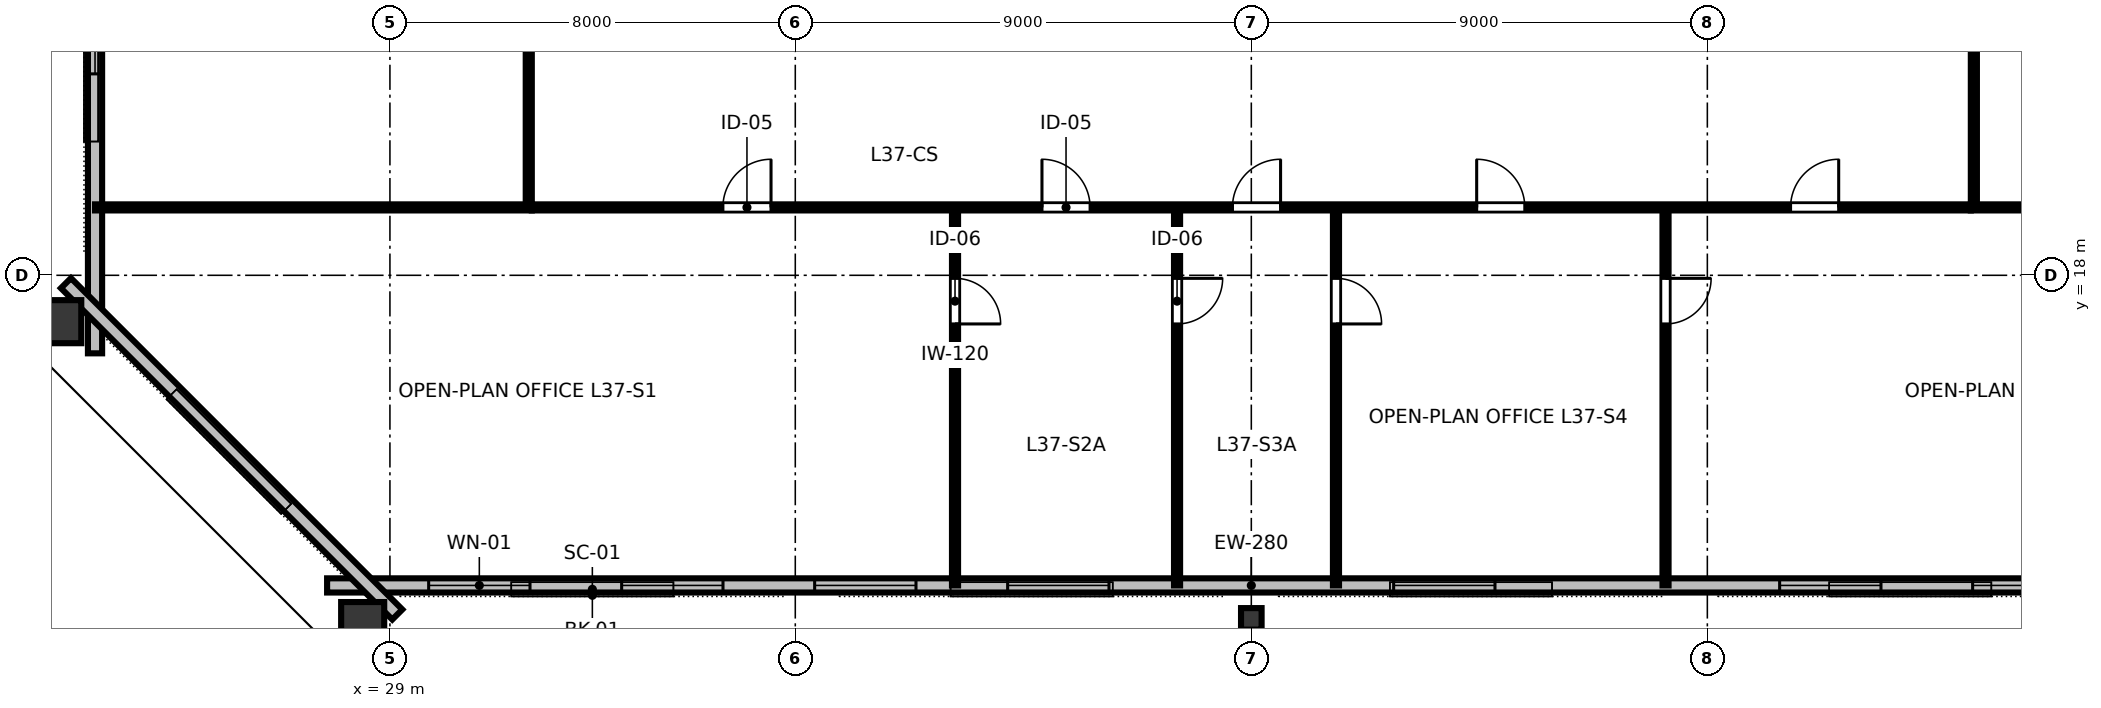
"""IFC4 building model, lengths in metres.
Left out: names, types, materials, properties, quantities, classifications, styles, units other than length and angle.
Written with IfcOpenShell. Run it as: python <this file> out.ifc"""

import sys

from ifc_helpers import new_model, si_unit, direction, frame, frame_2d, origin, origin_2d, place, context, subcontext, project, spatial, rectangle, hollow_rectangle, i_section, extrude, element, fill, save


model = new_model("IFC4")
c1 = context("Model", 3, precision=1e-05, world=origin(), true_north=direction((0.0, 1.0)))
c2 = subcontext(c1, "Body", "Model", "MODEL_VIEW")
j1 = project(units=[si_unit("LENGTHUNIT", "METRE"), si_unit("PLANEANGLEUNIT", "RADIAN")], contexts=[c1])
p1 = place(None, origin())
s1 = spatial("IfcSite", under=j1, at=p1, CompositionType="ELEMENT")
p2 = place(p1, origin())
s2 = spatial("IfcBuilding", under=s1, at=p2, CompositionType="ELEMENT")
p3 = place(p2, frame((0.0, 0.0, 142.0)))
s3 = spatial("IfcBuildingStorey", under=s2, at=p3, CompositionType="ELEMENT", Elevation=142.0)
p4 = place(p3, frame((28.462, 11.052, 0.0), z_axis=(0.0, 0.0, 1.0), x_axis=(1.0, 0.0, 0.0)))
e1 = element("IfcColumn", 1, at=p4, inside=s3, PredefinedType="COLUMN", context=c2, shape_type="SweptSolid", body=[
    extrude(hollow_rectangle(XDim=0.85, YDim=1.0, WallThickness=0.05, at=origin_2d()), origin(), (0.0, 0.0, 1.0), 3.358),
])
p5 = place(p3, frame((46.0, 11.22, 0.0), z_axis=(0.0, 0.0, 1.0), x_axis=(1.0, 0.0, 0.0)))
e2 = element("IfcColumn", 2, at=p5, inside=s3, PredefinedType="COLUMN", context=c2, shape_type="SweptSolid", body=[
    extrude(i_section(OverallWidth=0.406, OverallDepth=0.425, WebThickness=0.033, FlangeThickness=0.052, FilletRadius=0.025, at=origin_2d()), origin(), (0.0, 0.0, 1.0), 3.358),
])
p6 = place(p3, frame((22.409, 17.085, 0.0), z_axis=(0.0, 0.0, 1.0), x_axis=(0.0, 1.0, 0.0)))
e3 = element("IfcColumn", 3, at=p6, inside=s3, PredefinedType="COLUMN", context=c2, shape_type="SweptSolid", body=[
    extrude(hollow_rectangle(XDim=0.85, YDim=1.0, WallThickness=0.05, at=origin_2d()), origin(), (0.0, 0.0, 1.0), 3.358),
])
p7 = place(p3, frame((27.76, 11.88, 0.0), z_axis=(0.0, 0.0, 1.0), x_axis=(1.0, 0.0, 0.0)))
e4 = element("IfcWall", 4, at=p7, inside=s3, PredefinedType="STANDARD", context=c2, shape_type="SweptSolid", body=[
    extrude(rectangle(XDim=36.48, YDim=0.28, at=frame_2d((18.24, 0.0))), origin(), (0.0, 0.0, 1.0), 3.36),
])
p8 = place(p7, frame((2.004, 0.0, 0.8)))
e5 = element("IfcOpeningElement", 5, at=p8, cuts=e4, PredefinedType="OPENING", context=c2, shape_type="SweptSolid", body=[
    extrude(rectangle(XDim=2.0, YDim=1.95, at=frame_2d((1.0, 0.975))), frame((0.0, 0.15, 0.0), z_axis=(0.0, -1.0, 0.0), x_axis=(1.0, 0.0, 0.0)), (0.0, 0.0, 1.0), 0.3),
])
p9 = place(p7, frame((5.813, 0.0, 0.8)))
e6 = element("IfcOpeningElement", 6, at=p9, cuts=e4, PredefinedType="OPENING", context=c2, shape_type="SweptSolid", body=[
    extrude(rectangle(XDim=2.0, YDim=1.95, at=frame_2d((1.0, 0.975))), frame((0.0, 0.15, 0.0), z_axis=(0.0, -1.0, 0.0), x_axis=(1.0, 0.0, 0.0)), (0.0, 0.0, 1.0), 0.3),
])
p10 = place(p7, frame((9.622, 0.0, 0.8)))
e7 = element("IfcOpeningElement", 7, at=p10, cuts=e4, PredefinedType="OPENING", context=c2, shape_type="SweptSolid", body=[
    extrude(rectangle(XDim=2.0, YDim=1.95, at=frame_2d((1.0, 0.975))), frame((0.0, 0.15, 0.0), z_axis=(0.0, -1.0, 0.0), x_axis=(1.0, 0.0, 0.0)), (0.0, 0.0, 1.0), 0.3),
])
p11 = place(p7, frame((13.431, 0.0, 0.8)))
e8 = element("IfcOpeningElement", 8, at=p11, cuts=e4, PredefinedType="OPENING", context=c2, shape_type="SweptSolid", body=[
    extrude(rectangle(XDim=2.0, YDim=1.95, at=frame_2d((1.0, 0.975))), frame((0.0, 0.15, 0.0), z_axis=(0.0, -1.0, 0.0), x_axis=(1.0, 0.0, 0.0)), (0.0, 0.0, 1.0), 0.3),
])
p12 = place(p7, frame((21.049, 0.0, 0.8)))
e9 = element("IfcOpeningElement", 9, at=p12, cuts=e4, PredefinedType="OPENING", context=c2, shape_type="SweptSolid", body=[
    extrude(rectangle(XDim=2.0, YDim=1.95, at=frame_2d((1.0, 0.975))), frame((0.0, 0.15, 0.0), z_axis=(0.0, -1.0, 0.0), x_axis=(1.0, 0.0, 0.0)), (0.0, 0.0, 1.0), 0.3),
])
p13 = place(p7, frame((28.667, 0.0, 0.8)))
e10 = element("IfcOpeningElement", 10, at=p13, cuts=e4, PredefinedType="OPENING", context=c2, shape_type="SweptSolid", body=[
    extrude(rectangle(XDim=2.0, YDim=1.95, at=frame_2d((1.0, 0.975))), frame((0.0, 0.15, 0.0), z_axis=(0.0, -1.0, 0.0), x_axis=(1.0, 0.0, 0.0)), (0.0, 0.0, 1.0), 0.3),
])
p14 = place(p7, frame((32.476, 0.0, 0.8)))
e11 = element("IfcOpeningElement", 11, at=p14, cuts=e4, PredefinedType="OPENING", context=c2, shape_type="SweptSolid", body=[
    extrude(rectangle(XDim=2.0, YDim=1.95, at=frame_2d((1.0, 0.975))), frame((0.0, 0.15, 0.0), z_axis=(0.0, -1.0, 0.0), x_axis=(1.0, 0.0, 0.0)), (0.0, 0.0, 1.0), 0.3),
])
p15 = place(p3, frame((23.18, 47.54, 0.0), z_axis=(0.0, 0.0, 1.0), x_axis=(0.0, -1.0, 0.0)))
e12 = element("IfcWall", 12, at=p15, inside=s3, PredefinedType="STANDARD", context=c2, shape_type="SweptSolid", body=[
    extrude(rectangle(XDim=31.08, YDim=0.28, at=frame_2d((15.54, 0.0))), origin(), (0.0, 0.0, 1.0), 3.36),
])
p16 = place(p15, frame((11.86, 0.0, 0.0)))
e13 = element("IfcOpeningElement", 13, at=p16, cuts=e12, PredefinedType="OPENING", context=c2, shape_type="SweptSolid", body=[
    extrude(rectangle(XDim=1.4, YDim=2.15, at=frame_2d((0.7, 1.075))), frame((0.0, 0.15, 0.0), z_axis=(0.0, -1.0, 0.0), x_axis=(1.0, 0.0, 0.0)), (0.0, 0.0, 1.0), 0.3),
])
p17 = place(p15, frame((5.515, 0.0, 0.8)))
e14 = element("IfcOpeningElement", 14, at=p17, cuts=e12, PredefinedType="OPENING", context=c2, shape_type="SweptSolid", body=[
    extrude(rectangle(XDim=2.0, YDim=1.95, at=frame_2d((1.0, 0.975))), frame((0.0, 0.15, 0.0), z_axis=(0.0, -1.0, 0.0), x_axis=(1.0, 0.0, 0.0)), (0.0, 0.0, 1.0), 0.3),
])
p18 = place(p15, frame((9.125, 0.0, 0.8)))
e15 = element("IfcOpeningElement", 15, at=p18, cuts=e12, PredefinedType="OPENING", context=c2, shape_type="SweptSolid", body=[
    extrude(rectangle(XDim=2.0, YDim=1.95, at=frame_2d((1.0, 0.975))), frame((0.0, 0.15, 0.0), z_axis=(0.0, -1.0, 0.0), x_axis=(1.0, 0.0, 0.0)), (0.0, 0.0, 1.0), 0.3),
])
p19 = place(p15, frame((19.955, 0.0, 0.8)))
e16 = element("IfcOpeningElement", 16, at=p19, cuts=e12, PredefinedType="OPENING", context=c2, shape_type="SweptSolid", body=[
    extrude(rectangle(XDim=2.0, YDim=1.95, at=frame_2d((1.0, 0.975))), frame((0.0, 0.15, 0.0), z_axis=(0.0, -1.0, 0.0), x_axis=(1.0, 0.0, 0.0)), (0.0, 0.0, 1.0), 0.3),
])
p20 = place(p15, frame((23.565, 0.0, 0.8)))
e17 = element("IfcOpeningElement", 17, at=p20, cuts=e12, PredefinedType="OPENING", context=c2, shape_type="SweptSolid", body=[
    extrude(rectangle(XDim=2.0, YDim=1.95, at=frame_2d((1.0, 0.975))), frame((0.0, 0.15, 0.0), z_axis=(0.0, -1.0, 0.0), x_axis=(1.0, 0.0, 0.0)), (0.0, 0.0, 1.0), 0.3),
])
p21 = place(p3, frame((22.606, 17.845, 0.0), z_axis=(0.0, 0.0, 1.0), x_axis=(0.707106781187, -0.707106781187, 0.0)))
e18 = element("IfcWall", 18, at=p21, inside=s3, PredefinedType="STANDARD", context=c2, shape_type="SweptSolid", body=[
    extrude(rectangle(XDim=9.248, YDim=0.28, at=frame_2d((4.624, 0.0))), origin(), (0.0, 0.0, 1.0), 3.36),
])
p22 = place(p3, frame((40.152, 19.34, 0.0), z_axis=(0.0, 0.0, 1.0), x_axis=(0.0, -1.0, 0.0)))
e19 = element("IfcWall", 19, at=p22, inside=s3, PredefinedType="PARTITIONING", context=c2, shape_type="SweptSolid", body=[
    extrude(rectangle(XDim=7.46, YDim=0.12, at=frame_2d((3.73, 0.0))), origin(), (0.0, 0.0, 1.0), 2.64),
])
p23 = place(p22, frame((1.4, 0.0, 0.0)))
e20 = element("IfcOpeningElement", 20, at=p23, cuts=e19, PredefinedType="OPENING", context=c2, shape_type="SweptSolid", body=[
    extrude(rectangle(XDim=0.9, YDim=2.15, at=frame_2d((0.45, 1.075))), frame((0.0, 0.07, 0.0), z_axis=(0.0, -1.0, 0.0), x_axis=(1.0, 0.0, 0.0)), (0.0, 0.0, 1.0), 0.14),
])
p24 = place(p3, frame((44.534, 19.34, 0.0), z_axis=(0.0, 0.0, 1.0), x_axis=(0.0, -1.0, 0.0)))
e21 = element("IfcWall", 21, at=p24, inside=s3, PredefinedType="PARTITIONING", context=c2, shape_type="SweptSolid", body=[
    extrude(rectangle(XDim=7.46, YDim=0.12, at=frame_2d((3.73, 0.0))), origin(), (0.0, 0.0, 1.0), 2.64),
])
p25 = place(p24, frame((1.4, 0.0, 0.0)))
e22 = element("IfcOpeningElement", 22, at=p25, cuts=e21, PredefinedType="OPENING", context=c2, shape_type="SweptSolid", body=[
    extrude(rectangle(XDim=0.9, YDim=2.15, at=frame_2d((0.45, 1.075))), frame((0.0, 0.07, 0.0), z_axis=(0.0, -1.0, 0.0), x_axis=(1.0, 0.0, 0.0)), (0.0, 0.0, 1.0), 0.14),
])
p26 = place(p3, frame((47.671, 19.34, 0.0), z_axis=(0.0, 0.0, 1.0), x_axis=(0.0, -1.0, 0.0)))
e23 = element("IfcWall", 23, at=p26, inside=s3, PredefinedType="PARTITIONING", context=c2, shape_type="SweptSolid", body=[
    extrude(rectangle(XDim=7.46, YDim=0.12, at=frame_2d((3.73, 0.0))), origin(), (0.0, 0.0, 1.0), 2.64),
])
p27 = place(p26, frame((1.4, 0.0, 0.0)))
e24 = element("IfcOpeningElement", 24, at=p27, cuts=e23, PredefinedType="OPENING", context=c2, shape_type="SweptSolid", body=[
    extrude(rectangle(XDim=0.9, YDim=2.15, at=frame_2d((0.45, 1.075))), frame((0.0, 0.07, 0.0), z_axis=(0.0, -1.0, 0.0), x_axis=(1.0, 0.0, 0.0)), (0.0, 0.0, 1.0), 0.14),
])
p28 = place(p3, frame((54.175, 19.34, 0.0), z_axis=(0.0, 0.0, 1.0), x_axis=(0.0, -1.0, 0.0)))
e25 = element("IfcWall", 25, at=p28, inside=s3, PredefinedType="PARTITIONING", context=c2, shape_type="SweptSolid", body=[
    extrude(rectangle(XDim=7.46, YDim=0.12, at=frame_2d((3.73, 0.0))), origin(), (0.0, 0.0, 1.0), 2.64),
])
p29 = place(p28, frame((1.4, 0.0, 0.0)))
e26 = element("IfcOpeningElement", 26, at=p29, cuts=e25, PredefinedType="OPENING", context=c2, shape_type="SweptSolid", body=[
    extrude(rectangle(XDim=0.9, YDim=2.15, at=frame_2d((0.45, 1.075))), frame((0.0, 0.07, 0.0), z_axis=(0.0, -1.0, 0.0), x_axis=(1.0, 0.0, 0.0)), (0.0, 0.0, 1.0), 0.14),
])
p30 = place(p3, frame((31.8, 19.34, 0.0), z_axis=(0.0, 0.0, 1.0), x_axis=(1.0, 0.0, 0.0)))
e27 = element("IfcWall", 27, at=p30, inside=s3, PredefinedType="PARTITIONING", context=c2, shape_type="SweptSolid", body=[
    extrude(rectangle(XDim=28.4, YDim=0.12, at=frame_2d((14.2, 0.0))), origin(), (0.0, 0.0, 1.0), 2.64),
])
p31 = place(p30, frame((3.771, 0.0, 0.0)))
e28 = element("IfcOpeningElement", 28, at=p31, cuts=e27, PredefinedType="OPENING", context=c2, shape_type="SweptSolid", body=[
    extrude(rectangle(XDim=0.95, YDim=2.15, at=frame_2d((0.475, 1.075))), frame((0.0, 0.07, 0.0), z_axis=(0.0, -1.0, 0.0), x_axis=(1.0, 0.0, 0.0)), (0.0, 0.0, 1.0), 0.14),
])
p32 = place(p30, frame((10.068, 0.0, 0.0)))
e29 = element("IfcOpeningElement", 29, at=p32, cuts=e27, PredefinedType="OPENING", context=c2, shape_type="SweptSolid", body=[
    extrude(rectangle(XDim=0.95, YDim=2.15, at=frame_2d((0.475, 1.075))), frame((0.0, 0.07, 0.0), z_axis=(0.0, -1.0, 0.0), x_axis=(1.0, 0.0, 0.0)), (0.0, 0.0, 1.0), 0.14),
])
p33 = place(p30, frame((13.828, 0.0, 0.0)))
e30 = element("IfcOpeningElement", 30, at=p33, cuts=e27, PredefinedType="OPENING", context=c2, shape_type="SweptSolid", body=[
    extrude(rectangle(XDim=0.95, YDim=2.15, at=frame_2d((0.475, 1.075))), frame((0.0, 0.07, 0.0), z_axis=(0.0, -1.0, 0.0), x_axis=(1.0, 0.0, 0.0)), (0.0, 0.0, 1.0), 0.14),
])
p34 = place(p30, frame((18.648, 0.0, 0.0)))
e31 = element("IfcOpeningElement", 31, at=p34, cuts=e27, PredefinedType="OPENING", context=c2, shape_type="SweptSolid", body=[
    extrude(rectangle(XDim=0.95, YDim=2.15, at=frame_2d((0.475, 1.075))), frame((0.0, 0.07, 0.0), z_axis=(0.0, -1.0, 0.0), x_axis=(1.0, 0.0, 0.0)), (0.0, 0.0, 1.0), 0.14),
])
p35 = place(p30, frame((24.842, 0.0, 0.0)))
e32 = element("IfcOpeningElement", 32, at=p35, cuts=e27, PredefinedType="OPENING", context=c2, shape_type="SweptSolid", body=[
    extrude(rectangle(XDim=0.95, YDim=2.15, at=frame_2d((0.475, 1.075))), frame((0.0, 0.07, 0.0), z_axis=(0.0, -1.0, 0.0), x_axis=(1.0, 0.0, 0.0)), (0.0, 0.0, 1.0), 0.14),
])
p36 = place(p3, frame((31.74, 19.4, 0.0), z_axis=(0.0, 0.0, 1.0), x_axis=(0.0, 1.0, 0.0)))
e33 = element("IfcWall", 33, at=p36, inside=s3, PredefinedType="PARTITIONING", context=c2, shape_type="SweptSolid", body=[
    extrude(rectangle(XDim=11.58, YDim=0.12, at=frame_2d((5.79, 0.0))), origin(), (0.0, 0.0, 1.0), 2.64),
])
p37 = place(p36, frame((4.868, 0.0, 0.0)))
e34 = element("IfcOpeningElement", 34, at=p37, cuts=e33, PredefinedType="OPENING", context=c2, shape_type="SweptSolid", body=[
    extrude(rectangle(XDim=0.95, YDim=2.15, at=frame_2d((0.475, 1.075))), frame((0.0, 0.07, 0.0), z_axis=(0.0, -1.0, 0.0), x_axis=(1.0, 0.0, 0.0)), (0.0, 0.0, 1.0), 0.14),
])
p38 = place(p3, frame((60.26, 19.4, 0.0), z_axis=(0.0, 0.0, 1.0), x_axis=(0.0, 1.0, 0.0)))
e35 = element("IfcWall", 35, at=p38, inside=s3, PredefinedType="PARTITIONING", context=c2, shape_type="SweptSolid", body=[
    extrude(rectangle(XDim=11.58, YDim=0.12, at=frame_2d((5.79, 0.0))), origin(), (0.0, 0.0, 1.0), 2.64),
])
p39 = place(p38, frame((5.415, 0.0, 0.0)))
e36 = element("IfcOpeningElement", 36, at=p39, cuts=e35, PredefinedType="OPENING", context=c2, shape_type="SweptSolid", body=[
    extrude(rectangle(XDim=0.95, YDim=2.15, at=frame_2d((0.475, 1.075))), frame((0.0, 0.07, 0.0), z_axis=(0.0, -1.0, 0.0), x_axis=(1.0, 0.0, 0.0)), (0.0, 0.0, 1.0), 0.14),
])
for number, where, z_axis, x_axis in (
    (37, (31.8, 19.34, 0.0), (0.0, 0.0, 1.0), (-1.0, 0.0, 0.0)),
    (38, (60.2, 19.34, 0.0), (0.0, 0.0, 1.0), (1.0, 0.0, 0.0)),
):
    element("IfcWall", number, at=place(p3, frame(where, z_axis=z_axis, x_axis=x_axis)), inside=s3, PredefinedType="PARTITIONING", context=c2, shape_type="SweptSolid", body=[
        extrude(rectangle(XDim=8.62, YDim=0.12, at=frame_2d((4.31, 0.0))), origin(), (0.0, 0.0, 1.0), 2.64),
    ])
p40 = place(p8, origin())
e39 = element("IfcWindow", 39, at=p40, inside=s3, PartitioningType="SINGLE_PANEL", PredefinedType="WINDOW", context=c2, shape_type="SweptSolid", body=[
    extrude(rectangle(XDim=2.0, YDim=1.95, at=frame_2d((1.0, 0.975))), frame((0.0, 0.03, 0.0), z_axis=(0.0, -1.0, 0.0), x_axis=(1.0, 0.0, 0.0)), (0.0, 0.0, 1.0), 0.06),
])
fill(e5, e39)
p41 = place(p9, origin())
e40 = element("IfcWindow", 40, at=p41, inside=s3, PartitioningType="SINGLE_PANEL", PredefinedType="WINDOW", context=c2, shape_type="SweptSolid", body=[
    extrude(rectangle(XDim=2.0, YDim=1.95, at=frame_2d((1.0, 0.975))), frame((0.0, 0.03, 0.0), z_axis=(0.0, -1.0, 0.0), x_axis=(1.0, 0.0, 0.0)), (0.0, 0.0, 1.0), 0.06),
])
fill(e6, e40)
p42 = place(p10, origin())
e41 = element("IfcWindow", 41, at=p42, inside=s3, PartitioningType="SINGLE_PANEL", PredefinedType="WINDOW", context=c2, shape_type="SweptSolid", body=[
    extrude(rectangle(XDim=2.0, YDim=1.95, at=frame_2d((1.0, 0.975))), frame((0.0, 0.03, 0.0), z_axis=(0.0, -1.0, 0.0), x_axis=(1.0, 0.0, 0.0)), (0.0, 0.0, 1.0), 0.06),
])
fill(e7, e41)
p43 = place(p11, origin())
e42 = element("IfcWindow", 42, at=p43, inside=s3, PartitioningType="SINGLE_PANEL", PredefinedType="WINDOW", context=c2, shape_type="SweptSolid", body=[
    extrude(rectangle(XDim=2.0, YDim=1.95, at=frame_2d((1.0, 0.975))), frame((0.0, 0.03, 0.0), z_axis=(0.0, -1.0, 0.0), x_axis=(1.0, 0.0, 0.0)), (0.0, 0.0, 1.0), 0.06),
])
fill(e8, e42)
p44 = place(p12, origin())
e43 = element("IfcWindow", 43, at=p44, inside=s3, PartitioningType="SINGLE_PANEL", PredefinedType="WINDOW", context=c2, shape_type="SweptSolid", body=[
    extrude(rectangle(XDim=2.0, YDim=1.95, at=frame_2d((1.0, 0.975))), frame((0.0, 0.03, 0.0), z_axis=(0.0, -1.0, 0.0), x_axis=(1.0, 0.0, 0.0)), (0.0, 0.0, 1.0), 0.06),
])
fill(e9, e43)
p45 = place(p13, origin())
e44 = element("IfcWindow", 44, at=p45, inside=s3, PartitioningType="SINGLE_PANEL", PredefinedType="WINDOW", context=c2, shape_type="SweptSolid", body=[
    extrude(rectangle(XDim=2.0, YDim=1.95, at=frame_2d((1.0, 0.975))), frame((0.0, 0.03, 0.0), z_axis=(0.0, -1.0, 0.0), x_axis=(1.0, 0.0, 0.0)), (0.0, 0.0, 1.0), 0.06),
])
fill(e10, e44)
p46 = place(p14, origin())
e45 = element("IfcWindow", 45, at=p46, inside=s3, PartitioningType="SINGLE_PANEL", PredefinedType="WINDOW", context=c2, shape_type="SweptSolid", body=[
    extrude(rectangle(XDim=2.0, YDim=1.95, at=frame_2d((1.0, 0.975))), frame((0.0, 0.03, 0.0), z_axis=(0.0, -1.0, 0.0), x_axis=(1.0, 0.0, 0.0)), (0.0, 0.0, 1.0), 0.06),
])
fill(e11, e45)
p47 = place(p20, origin())
e46 = element("IfcWindow", 46, at=p47, inside=s3, PartitioningType="SINGLE_PANEL", PredefinedType="WINDOW", context=c2, shape_type="SweptSolid", body=[
    extrude(rectangle(XDim=2.0, YDim=1.95, at=frame_2d((1.0, 0.975))), frame((0.0, 0.03, 0.0), z_axis=(0.0, -1.0, 0.0), x_axis=(1.0, 0.0, 0.0)), (0.0, 0.0, 1.0), 0.06),
])
fill(e17, e46)
p48 = place(p23, origin())
e47 = element("IfcDoor", 47, at=p48, inside=s3, OperationType="SINGLE_SWING_RIGHT", PredefinedType="DOOR", context=c2, shape_type="SweptSolid", body=[
    extrude(rectangle(XDim=0.9, YDim=2.15, at=frame_2d((0.45, 1.075))), frame((0.0, 0.025, 0.0), z_axis=(0.0, -1.0, 0.0), x_axis=(1.0, 0.0, 0.0)), (0.0, 0.0, 1.0), 0.05),
])
fill(e20, e47)
p49 = place(p25, origin())
e48 = element("IfcDoor", 48, at=p49, inside=s3, OperationType="SINGLE_SWING_LEFT", PredefinedType="DOOR", context=c2, shape_type="SweptSolid", body=[
    extrude(rectangle(XDim=0.9, YDim=2.15, at=frame_2d((0.45, 1.075))), frame((0.0, 0.025, 0.0), z_axis=(0.0, -1.0, 0.0), x_axis=(1.0, 0.0, 0.0)), (0.0, 0.0, 1.0), 0.05),
])
fill(e22, e48)
p50 = place(p27, origin())
e49 = element("IfcDoor", 49, at=p50, inside=s3, OperationType="SINGLE_SWING_RIGHT", PredefinedType="DOOR", context=c2, shape_type="SweptSolid", body=[
    extrude(rectangle(XDim=0.9, YDim=2.15, at=frame_2d((0.45, 1.075))), frame((0.0, 0.025, 0.0), z_axis=(0.0, -1.0, 0.0), x_axis=(1.0, 0.0, 0.0)), (0.0, 0.0, 1.0), 0.05),
])
fill(e24, e49)
p51 = place(p29, origin())
e50 = element("IfcDoor", 50, at=p51, inside=s3, OperationType="SINGLE_SWING_LEFT", PredefinedType="DOOR", context=c2, shape_type="SweptSolid", body=[
    extrude(rectangle(XDim=0.9, YDim=2.15, at=frame_2d((0.45, 1.075))), frame((0.0, 0.025, 0.0), z_axis=(0.0, -1.0, 0.0), x_axis=(1.0, 0.0, 0.0)), (0.0, 0.0, 1.0), 0.05),
])
fill(e26, e50)
p52 = place(p31, origin())
e51 = element("IfcDoor", 51, at=p52, inside=s3, OperationType="SINGLE_SWING_RIGHT", PredefinedType="DOOR", context=c2, shape_type="SweptSolid", body=[
    extrude(rectangle(XDim=0.95, YDim=2.15, at=frame_2d((0.475, 1.075))), frame((0.0, 0.025, 0.0), z_axis=(0.0, -1.0, 0.0), x_axis=(1.0, 0.0, 0.0)), (0.0, 0.0, 1.0), 0.05),
])
fill(e28, e51)
p53 = place(p32, origin())
e52 = element("IfcDoor", 52, at=p53, inside=s3, OperationType="SINGLE_SWING_LEFT", PredefinedType="DOOR", context=c2, shape_type="SweptSolid", body=[
    extrude(rectangle(XDim=0.95, YDim=2.15, at=frame_2d((0.475, 1.075))), frame((0.0, 0.025, 0.0), z_axis=(0.0, -1.0, 0.0), x_axis=(1.0, 0.0, 0.0)), (0.0, 0.0, 1.0), 0.05),
])
fill(e29, e52)
p54 = place(p33, origin())
e53 = element("IfcDoor", 53, at=p54, inside=s3, OperationType="SINGLE_SWING_RIGHT", PredefinedType="DOOR", context=c2, shape_type="SweptSolid", body=[
    extrude(rectangle(XDim=0.95, YDim=2.15, at=frame_2d((0.475, 1.075))), frame((0.0, 0.025, 0.0), z_axis=(0.0, -1.0, 0.0), x_axis=(1.0, 0.0, 0.0)), (0.0, 0.0, 1.0), 0.05),
])
fill(e30, e53)
p55 = place(p34, origin())
e54 = element("IfcDoor", 54, at=p55, inside=s3, OperationType="SINGLE_SWING_LEFT", PredefinedType="DOOR", context=c2, shape_type="SweptSolid", body=[
    extrude(rectangle(XDim=0.95, YDim=2.15, at=frame_2d((0.475, 1.075))), frame((0.0, 0.025, 0.0), z_axis=(0.0, -1.0, 0.0), x_axis=(1.0, 0.0, 0.0)), (0.0, 0.0, 1.0), 0.05),
])
fill(e31, e54)
p56 = place(p35, origin())
e55 = element("IfcDoor", 55, at=p56, inside=s3, OperationType="SINGLE_SWING_RIGHT", PredefinedType="DOOR", context=c2, shape_type="SweptSolid", body=[
    extrude(rectangle(XDim=0.95, YDim=2.15, at=frame_2d((0.475, 1.075))), frame((0.0, 0.025, 0.0), z_axis=(0.0, -1.0, 0.0), x_axis=(1.0, 0.0, 0.0)), (0.0, 0.0, 1.0), 0.05),
])
fill(e32, e55)
save(model, sys.argv[1])
